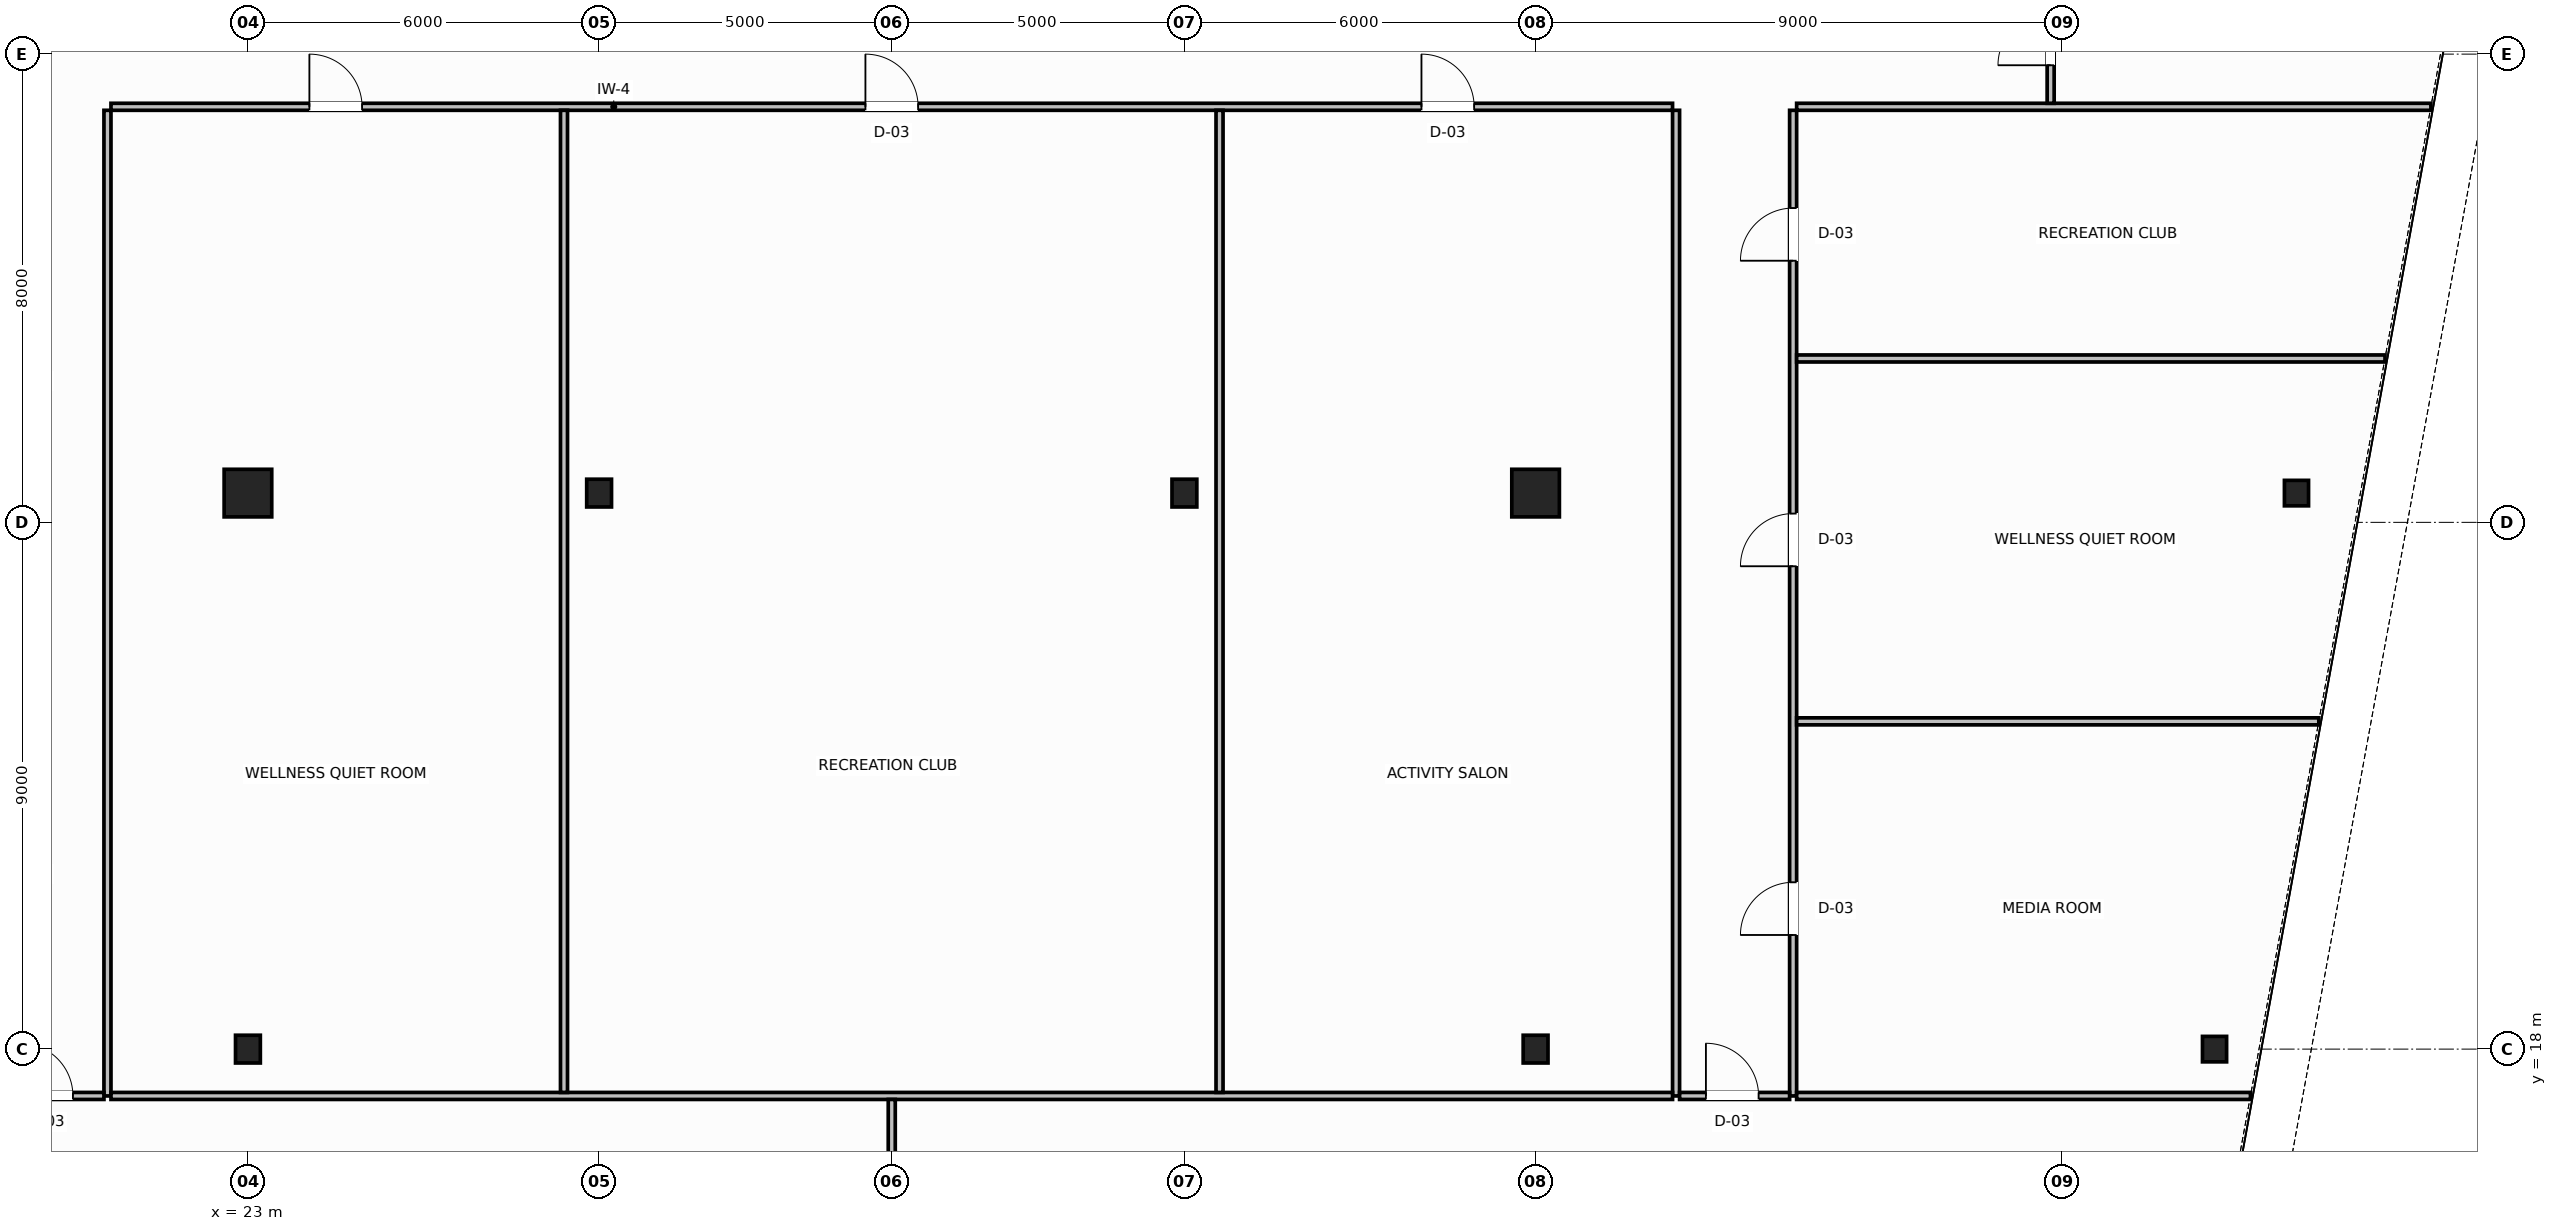
"""IFC4 building model, lengths in metres.
Left out: names, types, materials, properties, quantities, classifications, styles, units other than length and angle.
Written with IfcOpenShell. Run it as: python <this file> out.ifc"""

import sys

from ifc_helpers import new_model, si_unit, direction, frame, frame_2d, origin, origin_2d, place, context, subcontext, project, spatial, rectangle, hollow_circle, i_section, extrude, source, transform, mapped, element, fill, save


model = new_model("IFC4")
c1 = context("Model", 3, precision=1e-05, world=origin(), true_north=direction((0.0, 1.0)))
c2 = subcontext(c1, "Body", "Model", "MODEL_VIEW")
j1 = project(units=[si_unit("LENGTHUNIT", "METRE"), si_unit("PLANEANGLEUNIT", "RADIAN")], contexts=[c1])
p1 = place(None, origin())
s1 = spatial("IfcSite", under=j1, at=p1, CompositionType="ELEMENT")
p2 = place(p1, origin())
s2 = spatial("IfcBuilding", under=s1, at=p2, CompositionType="ELEMENT")
p3 = place(p2, frame((0.0, 0.0, 169.0)))
s3 = spatial("IfcBuildingStorey", under=s2, at=p3, CompositionType="ELEMENT", Elevation=169.0)
m1 = source(origin(), c2, "Body", "SweptSolid", [
    extrude(i_section(OverallWidth=0.412, OverallDepth=0.435, WebThickness=0.036, FlangeThickness=0.05, FilletRadius=0.015, at=origin_2d()), origin(), (0.0, 0.0, 1.0), 3.8),
])
for number, where, z_axis, x_axis in (
    (1, (58.0, 27.5, 0.0), (0.0, 0.0, 1.0), (1.0, 0.0, 0.0)),
    (2, (56.6, 18.0, 0.0), (0.0, 0.0, 1.0), (1.0, 0.0, 0.0)),
):
    element("IfcColumn", number, at=place(p3, frame(where, z_axis=z_axis, x_axis=x_axis)), inside=s3, PredefinedType="COLUMN", context=c2, shape_type="MappedRepresentation", body=[
        mapped(m1, transform((0.0, 0.0, 0.0), scale=1.0)),
    ])
m2 = source(origin(), c2, "Body", "SweptSolid", [
    extrude(hollow_circle(Radius=0.406, WallThickness=0.04, at=origin_2d()), origin(), (0.0, 0.0, 1.0), 3.8),
])
p4 = place(p3, frame((23.0, 27.5, 0.0), z_axis=(0.0, 0.0, 1.0), x_axis=(1.0, 0.0, 0.0)))
e3 = element("IfcColumn", 3, at=p4, inside=s3, PredefinedType="COLUMN", context=c2, shape_type="MappedRepresentation", body=[
    mapped(m2, transform((0.0, 0.0, 0.0), scale=1.0)),
])
m3 = source(origin(), c2, "Body", "SweptSolid", [
    extrude(i_section(OverallWidth=0.424, OverallDepth=0.474, WebThickness=0.047, FlangeThickness=0.065, FilletRadius=0.015, at=origin_2d()), origin(), (0.0, 0.0, 1.0), 3.8),
])
for number, where, z_axis, x_axis in (
    (4, (29.0, 27.5, 0.0), (0.0, 0.0, 1.0), (1.0, 0.0, 0.0)),
    (5, (39.0, 27.5, 0.0), (0.0, 0.0, 1.0), (1.0, 0.0, 0.0)),
):
    element("IfcColumn", number, at=place(p3, frame(where, z_axis=z_axis, x_axis=x_axis)), inside=s3, PredefinedType="COLUMN", context=c2, shape_type="MappedRepresentation", body=[
        mapped(m3, transform((0.0, 0.0, 0.0), scale=1.0)),
    ])
p5 = place(p3, frame((45.0, 27.5, 0.0), z_axis=(0.0, 0.0, 1.0), x_axis=(1.0, 0.0, 0.0)))
e6 = element("IfcColumn", 6, at=p5, inside=s3, PredefinedType="COLUMN", context=c2, shape_type="MappedRepresentation", body=[
    mapped(m2, transform((0.0, 0.0, 0.0), scale=1.0)),
])
for number, where, z_axis, x_axis in (
    (7, (23.0, 18.0, 0.0), (0.0, 0.0, 1.0), (1.0, 0.0, 0.0)),
    (8, (45.0, 18.0, 0.0), (0.0, 0.0, 1.0), (1.0, 0.0, 0.0)),
):
    element("IfcColumn", number, at=place(p3, frame(where, z_axis=z_axis, x_axis=x_axis)), inside=s3, PredefinedType="COLUMN", context=c2, shape_type="MappedRepresentation", body=[
        mapped(m3, transform((0.0, 0.0, 0.0), scale=1.0)),
    ])
p6 = place(p3, frame((20.66, 34.1, 0.0), z_axis=(0.0, 0.0, 1.0), x_axis=(1.0, 0.0, 0.0)))
e9 = element("IfcWall", 9, at=p6, inside=s3, PredefinedType="PARTITIONING", context=c2, shape_type="SweptSolid", body=[
    extrude(rectangle(XDim=26.68, YDim=0.12, at=frame_2d((13.34, 0.0))), origin(), (0.0, 0.0, 1.0), 3.58),
])
p7 = place(p6, frame((3.39, 0.0, 0.0)))
e10 = element("IfcOpeningElement", 10, at=p7, cuts=e9, PredefinedType="OPENING", context=c2, shape_type="SweptSolid", body=[
    extrude(rectangle(XDim=0.9, YDim=2.15, at=frame_2d((0.45, 1.075))), frame((0.0, 0.07, 0.0), z_axis=(0.0, -1.0, 0.0), x_axis=(1.0, 0.0, 0.0)), (0.0, 0.0, 1.0), 0.14),
])
p8 = place(p6, frame((12.89, 0.0, 0.0)))
e11 = element("IfcOpeningElement", 11, at=p8, cuts=e9, PredefinedType="OPENING", context=c2, shape_type="SweptSolid", body=[
    extrude(rectangle(XDim=0.9, YDim=2.15, at=frame_2d((0.45, 1.075))), frame((0.0, 0.07, 0.0), z_axis=(0.0, -1.0, 0.0), x_axis=(1.0, 0.0, 0.0)), (0.0, 0.0, 1.0), 0.14),
])
p9 = place(p6, frame((22.39, 0.0, 0.0)))
e12 = element("IfcOpeningElement", 12, at=p9, cuts=e9, PredefinedType="OPENING", context=c2, shape_type="SweptSolid", body=[
    extrude(rectangle(XDim=0.9, YDim=2.15, at=frame_2d((0.45, 1.075))), frame((0.0, 0.07, 0.0), z_axis=(0.0, -1.0, 0.0), x_axis=(1.0, 0.0, 0.0)), (0.0, 0.0, 1.0), 0.14),
])
p10 = place(p3, frame((49.46, 34.1, 0.0), z_axis=(0.0, 0.0, 1.0), x_axis=(1.0, 0.0, 0.0)))
e13 = element("IfcWall", 13, at=p10, inside=s3, PredefinedType="PARTITIONING", context=c2, shape_type="SweptSolid", body=[
    extrude(rectangle(XDim=10.837, YDim=0.12, at=frame_2d((5.418, 0.0))), origin(), (0.0, 0.0, 1.0), 3.58),
])
p11 = place(p3, frame((53.8, 34.16, 0.0), z_axis=(0.0, 0.0, 1.0), x_axis=(0.0, 1.0, 0.0)))
e14 = element("IfcWall", 14, at=p11, inside=s3, PredefinedType="PARTITIONING", context=c2, shape_type="SweptSolid", body=[
    extrude(rectangle(XDim=2.28, YDim=0.12, at=frame_2d((1.14, 0.0))), origin(), (0.0, 0.0, 1.0), 3.58),
])
p12 = place(p11, frame((0.65, 0.0, 0.0)))
e15 = element("IfcOpeningElement", 15, at=p12, cuts=e14, PredefinedType="OPENING", context=c2, shape_type="SweptSolid", body=[
    extrude(rectangle(XDim=0.9, YDim=2.15, at=frame_2d((0.45, 1.075))), frame((0.0, 0.07, 0.0), z_axis=(0.0, -1.0, 0.0), x_axis=(1.0, 0.0, 0.0)), (0.0, 0.0, 1.0), 0.14),
])
for number, where, z_axis, x_axis in (
    (16, (20.6, 17.2, 0.0), (0.0, 0.0, 1.0), (0.0, 1.0, 0.0)),
    (17, (47.4, 17.2, 0.0), (0.0, 0.0, 1.0), (0.0, 1.0, 0.0)),
):
    element("IfcWall", number, at=place(p3, frame(where, z_axis=z_axis, x_axis=x_axis)), inside=s3, PredefinedType="PARTITIONING", context=c2, shape_type="SweptSolid", body=[
        extrude(rectangle(XDim=16.84, YDim=0.12, at=frame_2d((8.42, 0.0))), origin(), (0.0, 0.0, 1.0), 3.58),
    ])
p13 = place(p3, frame((49.4, 17.2, 0.0), z_axis=(0.0, 0.0, 1.0), x_axis=(0.0, 1.0, 0.0)))
e18 = element("IfcWall", 18, at=p13, inside=s3, PredefinedType="PARTITIONING", context=c2, shape_type="SweptSolid", body=[
    extrude(rectangle(XDim=16.84, YDim=0.12, at=frame_2d((8.42, 0.0))), origin(), (0.0, 0.0, 1.0), 3.58),
])
p14 = place(p13, frame((2.75, 0.0, 0.0)))
e19 = element("IfcOpeningElement", 19, at=p14, cuts=e18, PredefinedType="OPENING", context=c2, shape_type="SweptSolid", body=[
    extrude(rectangle(XDim=0.9, YDim=2.15, at=frame_2d((0.45, 1.075))), frame((0.0, 0.07, 0.0), z_axis=(0.0, -1.0, 0.0), x_axis=(1.0, 0.0, 0.0)), (0.0, 0.0, 1.0), 0.14),
])
p15 = place(p13, frame((9.05, 0.0, 0.0)))
e20 = element("IfcOpeningElement", 20, at=p15, cuts=e18, PredefinedType="OPENING", context=c2, shape_type="SweptSolid", body=[
    extrude(rectangle(XDim=0.9, YDim=2.15, at=frame_2d((0.45, 1.075))), frame((0.0, 0.07, 0.0), z_axis=(0.0, -1.0, 0.0), x_axis=(1.0, 0.0, 0.0)), (0.0, 0.0, 1.0), 0.14),
])
p16 = place(p13, frame((14.27, 0.0, 0.0)))
e21 = element("IfcOpeningElement", 21, at=p16, cuts=e18, PredefinedType="OPENING", context=c2, shape_type="SweptSolid", body=[
    extrude(rectangle(XDim=0.9, YDim=2.15, at=frame_2d((0.45, 1.075))), frame((0.0, 0.07, 0.0), z_axis=(0.0, -1.0, 0.0), x_axis=(1.0, 0.0, 0.0)), (0.0, 0.0, 1.0), 0.14),
])
p17 = place(p3, frame((18.66, 17.2, 0.0), z_axis=(0.0, 0.0, 1.0), x_axis=(1.0, 0.0, 0.0)))
e22 = element("IfcWall", 22, at=p17, inside=s3, PredefinedType="PARTITIONING", context=c2, shape_type="SweptSolid", body=[
    extrude(rectangle(XDim=1.88, YDim=0.12, at=frame_2d((0.94, 0.0))), origin(), (0.0, 0.0, 1.0), 3.58),
])
p18 = place(p17, frame((0.45, 0.0, 0.0)))
e23 = element("IfcOpeningElement", 23, at=p18, cuts=e22, PredefinedType="OPENING", context=c2, shape_type="SweptSolid", body=[
    extrude(rectangle(XDim=0.9, YDim=2.15, at=frame_2d((0.45, 1.075))), frame((0.0, 0.07, 0.0), z_axis=(0.0, -1.0, 0.0), x_axis=(1.0, 0.0, 0.0)), (0.0, 0.0, 1.0), 0.14),
])
p19 = place(p3, frame((47.46, 17.2, 0.0), z_axis=(0.0, 0.0, 1.0), x_axis=(1.0, 0.0, 0.0)))
e24 = element("IfcWall", 24, at=p19, inside=s3, PredefinedType="PARTITIONING", context=c2, shape_type="SweptSolid", body=[
    extrude(rectangle(XDim=1.88, YDim=0.12, at=frame_2d((0.94, 0.0))), origin(), (0.0, 0.0, 1.0), 3.58),
])
p20 = place(p19, frame((0.45, 0.0, 0.0)))
e25 = element("IfcOpeningElement", 25, at=p20, cuts=e24, PredefinedType="OPENING", context=c2, shape_type="SweptSolid", body=[
    extrude(rectangle(XDim=0.9, YDim=2.15, at=frame_2d((0.45, 1.075))), frame((0.0, 0.07, 0.0), z_axis=(0.0, -1.0, 0.0), x_axis=(1.0, 0.0, 0.0)), (0.0, 0.0, 1.0), 0.14),
])
p21 = place(p3, frame((49.46, 17.2, 0.0), z_axis=(0.0, 0.0, 1.0), x_axis=(1.0, 0.0, 0.0)))
e26 = element("IfcWall", 26, at=p21, inside=s3, PredefinedType="PARTITIONING", context=c2, shape_type="SweptSolid", body=[
    extrude(rectangle(XDim=7.754, YDim=0.12, at=frame_2d((3.877, 0.0))), origin(), (0.0, 0.0, 1.0), 3.58),
])
p22 = place(p3, frame((49.46, 23.6, 0.0), z_axis=(0.0, 0.0, 1.0), x_axis=(1.0, 0.0, 0.0)))
e27 = element("IfcWall", 27, at=p22, inside=s3, PredefinedType="PARTITIONING", context=c2, shape_type="SweptSolid", body=[
    extrude(rectangle(XDim=8.922, YDim=0.12, at=frame_2d((4.461, 0.0))), origin(), (0.0, 0.0, 1.0), 3.58),
])
p23 = place(p3, frame((49.46, 29.8, 0.0), z_axis=(0.0, 0.0, 1.0), x_axis=(1.0, 0.0, 0.0)))
e28 = element("IfcWall", 28, at=p23, inside=s3, PredefinedType="PARTITIONING", context=c2, shape_type="SweptSolid", body=[
    extrude(rectangle(XDim=10.052, YDim=0.12, at=frame_2d((5.026, 0.0))), origin(), (0.0, 0.0, 1.0), 3.58),
])
p24 = place(p3, frame((20.66, 17.2, 0.0), z_axis=(0.0, 0.0, 1.0), x_axis=(1.0, 0.0, 0.0)))
e29 = element("IfcWall", 29, at=p24, inside=s3, PredefinedType="PARTITIONING", context=c2, shape_type="SweptSolid", body=[
    extrude(rectangle(XDim=26.68, YDim=0.12, at=frame_2d((13.34, 0.0))), origin(), (0.0, 0.0, 1.0), 3.58),
])
for number, where, z_axis, x_axis in (
    (30, (28.4, 17.26, 0.0), (0.0, 0.0, 1.0), (0.0, 1.0, 0.0)),
    (31, (39.6, 17.26, 0.0), (0.0, 0.0, 1.0), (0.0, 1.0, 0.0)),
):
    element("IfcWall", number, at=place(p3, frame(where, z_axis=z_axis, x_axis=x_axis)), inside=s3, PredefinedType="PARTITIONING", context=c2, shape_type="SweptSolid", body=[
        extrude(rectangle(XDim=16.78, YDim=0.12, at=frame_2d((8.39, 0.0))), origin(), (0.0, 0.0, 1.0), 3.58),
    ])
p25 = place(p3, frame((34.0, 7.64, 0.0), z_axis=(0.0, 0.0, 1.0), x_axis=(0.0, 1.0, 0.0)))
e32 = element("IfcWall", 32, at=p25, inside=s3, PredefinedType="PARTITIONING", context=c2, shape_type="SweptSolid", body=[
    extrude(rectangle(XDim=9.5, YDim=0.12, at=frame_2d((4.75, 0.0))), origin(), (0.0, 0.0, 1.0), 3.58),
])
p26 = place(p25, frame((4.3, 0.0, 0.0)))
e33 = element("IfcOpeningElement", 33, at=p26, cuts=e32, PredefinedType="OPENING", context=c2, shape_type="SweptSolid", body=[
    extrude(rectangle(XDim=0.9, YDim=2.15, at=frame_2d((0.45, 1.075))), frame((0.0, 0.07, 0.0), z_axis=(0.0, -1.0, 0.0), x_axis=(1.0, 0.0, 0.0)), (0.0, 0.0, 1.0), 0.14),
])
m4 = source(origin(), c2, "Body", "SweptSolid", [
    extrude(rectangle(XDim=0.9, YDim=2.15, at=frame_2d((0.45, 1.075))), frame((0.0, 0.025, 0.0), z_axis=(0.0, -1.0, 0.0), x_axis=(1.0, 0.0, 0.0)), (0.0, 0.0, 1.0), 0.05),
])
p27 = place(p12, origin())
e34 = element("IfcDoor", 34, at=p27, inside=s3, OperationType="SINGLE_SWING_RIGHT", PredefinedType="DOOR", context=c2, shape_type="MappedRepresentation", body=[
    mapped(m4, transform((0.0, 0.0, 0.0), scale=1.0)),
])
fill(e15, e34)
p28 = place(p14, origin())
e35 = element("IfcDoor", 35, at=p28, inside=s3, OperationType="SINGLE_SWING_RIGHT", PredefinedType="DOOR", context=c2, shape_type="MappedRepresentation", body=[
    mapped(m4, transform((0.0, 0.0, 0.0), scale=1.0)),
])
fill(e19, e35)
p29 = place(p15, origin())
e36 = element("IfcDoor", 36, at=p29, inside=s3, OperationType="SINGLE_SWING_LEFT", PredefinedType="DOOR", context=c2, shape_type="MappedRepresentation", body=[
    mapped(m4, transform((0.0, 0.0, 0.0), scale=1.0)),
])
fill(e20, e36)
p30 = place(p16, origin())
e37 = element("IfcDoor", 37, at=p30, inside=s3, OperationType="SINGLE_SWING_RIGHT", PredefinedType="DOOR", context=c2, shape_type="MappedRepresentation", body=[
    mapped(m4, transform((0.0, 0.0, 0.0), scale=1.0)),
])
fill(e21, e37)
p31 = place(p7, origin())
e38 = element("IfcDoor", 38, at=p31, inside=s3, OperationType="SINGLE_SWING_LEFT", PredefinedType="DOOR", context=c2, shape_type="MappedRepresentation", body=[
    mapped(m4, transform((0.0, 0.0, 0.0), scale=1.0)),
])
fill(e10, e38)
p32 = place(p8, origin())
e39 = element("IfcDoor", 39, at=p32, inside=s3, OperationType="SINGLE_SWING_RIGHT", PredefinedType="DOOR", context=c2, shape_type="MappedRepresentation", body=[
    mapped(m4, transform((0.0, 0.0, 0.0), scale=1.0)),
])
fill(e11, e39)
p33 = place(p9, origin())
e40 = element("IfcDoor", 40, at=p33, inside=s3, OperationType="SINGLE_SWING_LEFT", PredefinedType="DOOR", context=c2, shape_type="MappedRepresentation", body=[
    mapped(m4, transform((0.0, 0.0, 0.0), scale=1.0)),
])
fill(e12, e40)
p34 = place(p18, origin())
e41 = element("IfcDoor", 41, at=p34, inside=s3, OperationType="SINGLE_SWING_LEFT", PredefinedType="DOOR", context=c2, shape_type="MappedRepresentation", body=[
    mapped(m4, transform((0.0, 0.0, 0.0), scale=1.0)),
])
fill(e23, e41)
p35 = place(p20, origin())
e42 = element("IfcDoor", 42, at=p35, inside=s3, OperationType="SINGLE_SWING_RIGHT", PredefinedType="DOOR", context=c2, shape_type="MappedRepresentation", body=[
    mapped(m4, transform((0.0, 0.0, 0.0), scale=1.0)),
])
fill(e25, e42)
save(model, sys.argv[1])
